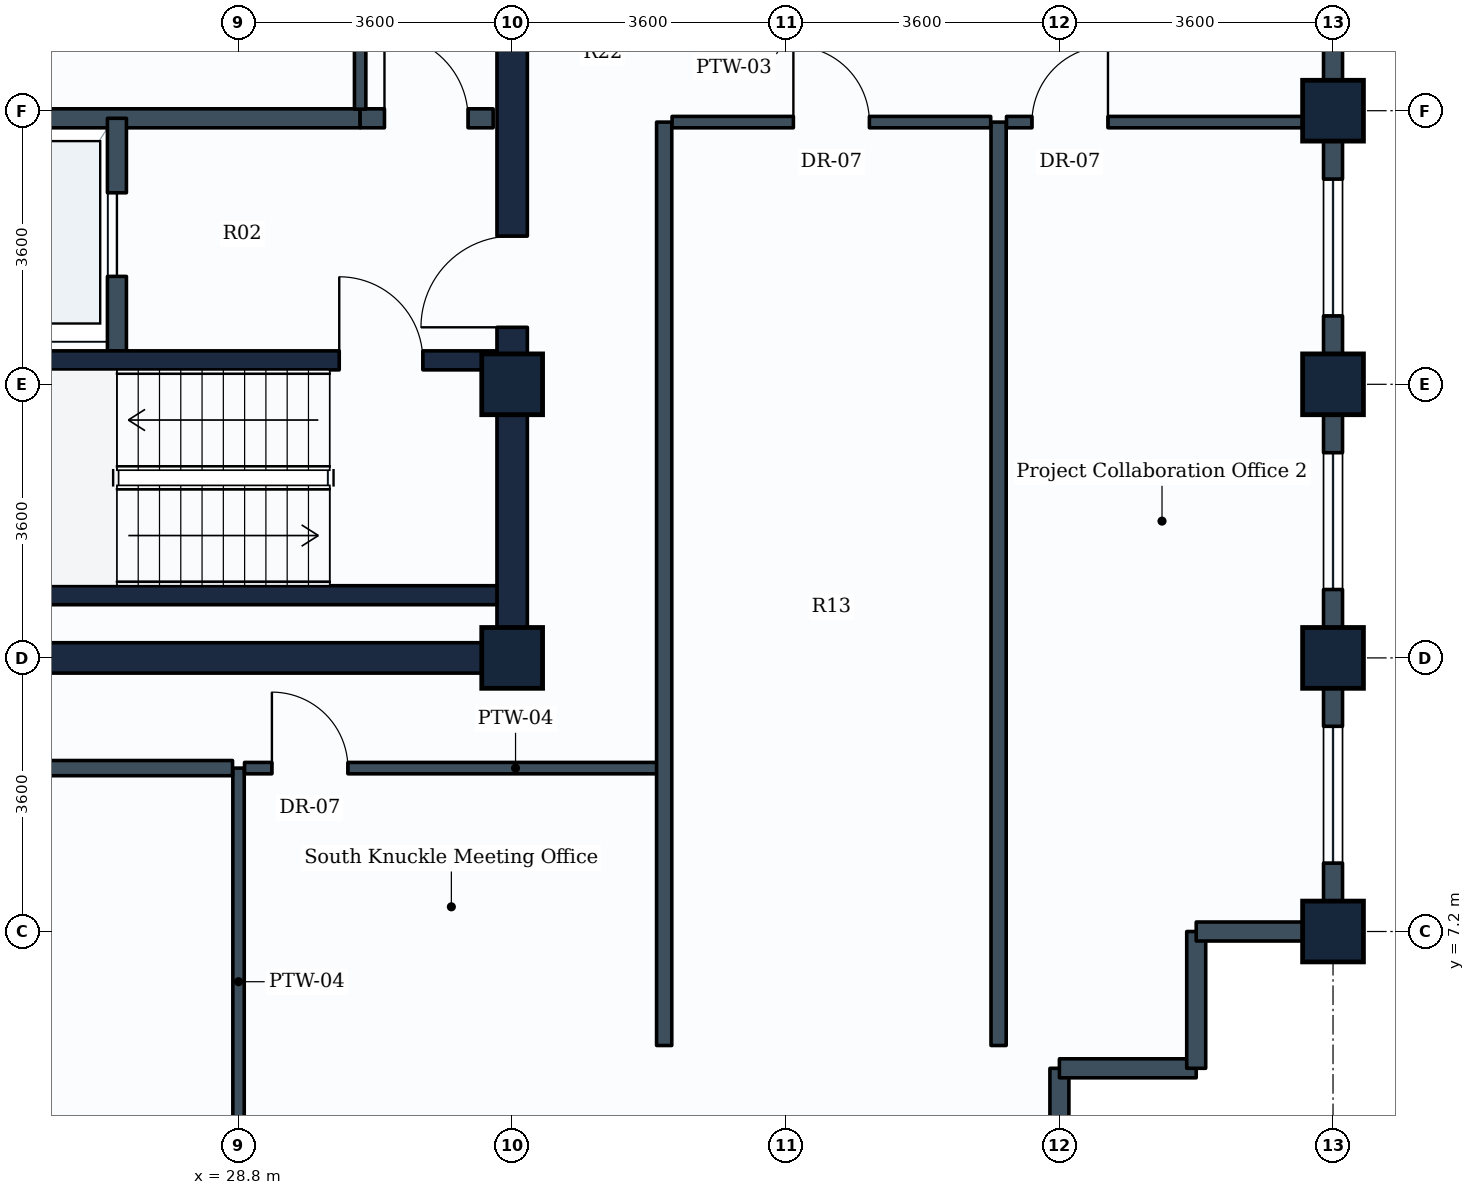
"""IFC4 building model, lengths in metres.
Left out: names, types, materials, properties, quantities, classifications, styles, units other than length and angle.
Written with IfcOpenShell. Run it as: python <this file> out.ifc"""

import sys

from ifc_helpers import new_model, si_unit, direction, frame, frame_2d, origin, origin_2d, place, context, subcontext, project, spatial, rectangle, extrude, element, fill, save


model = new_model("IFC4")
c1 = context("Model", 3, precision=1e-05, world=origin(), true_north=direction((0.0, 1.0)))
c2 = subcontext(c1, "Body", "Model", "MODEL_VIEW")
j1 = project(units=[si_unit("LENGTHUNIT", "METRE"), si_unit("PLANEANGLEUNIT", "RADIAN")], contexts=[c1])
p1 = place(None, origin())
s1 = spatial("IfcSite", under=j1, at=p1, CompositionType="ELEMENT")
p2 = place(p1, origin())
s2 = spatial("IfcBuilding", under=s1, at=p2, CompositionType="ELEMENT")
p3 = place(p2, frame((0.0, 0.0, 273.8)))
s3 = spatial("IfcBuildingStorey", under=s2, at=p3, CompositionType="ELEMENT", Elevation=273.8)
for number, where, z_axis, x_axis in (
    (1, (32.4, 10.8, 0.0), (0.0, 0.0, 1.0), (1.0, 0.0, 0.0)),
    (2, (32.4, 14.4, 0.0), (0.0, 0.0, 1.0), (1.0, 0.0, 0.0)),
    (3, (43.2, 7.2, 0.0), (0.0, 0.0, 1.0), (1.0, 0.0, 0.0)),
    (4, (43.2, 10.8, 0.0), (0.0, 0.0, 1.0), (0.0, 1.0, 0.0)),
    (5, (43.2, 14.4, 0.0), (0.0, 0.0, 1.0), (0.0, 1.0, 0.0)),
    (6, (43.2, 18.0, 0.0), (0.0, 0.0, 1.0), (0.0, 1.0, 0.0)),
):
    element("IfcColumn", number, at=place(p3, frame(where, z_axis=z_axis, x_axis=x_axis)), inside=s3, PredefinedType="COLUMN", context=c2, shape_type="SweptSolid", body=[
        extrude(rectangle(XDim=0.8, YDim=0.8, at=origin_2d()), origin(), (0.0, 0.0, 1.0), 3.6),
    ])
p4 = place(p3, frame((39.6, 5.4, 0.0), z_axis=(0.0, 0.0, 1.0), x_axis=(0.0, -1.0, 0.0)))
e7 = element("IfcWall", 7, at=p4, inside=s3, PredefinedType="STANDARD", context=c2, shape_type="SweptSolid", body=[
    extrude(rectangle(XDim=1.8, YDim=0.25, at=frame_2d((0.9, 0.0))), origin(), (0.0, 0.0, 1.0), 2.83),
])
p5 = place(p3, frame((41.4, 5.4, 0.0), z_axis=(0.0, 0.0, 1.0), x_axis=(-1.0, 0.0, 0.0)))
e8 = element("IfcWall", 8, at=p5, inside=s3, PredefinedType="STANDARD", context=c2, shape_type="SweptSolid", body=[
    extrude(rectangle(XDim=1.8, YDim=0.25, at=frame_2d((0.9, 0.0))), origin(), (0.0, 0.0, 1.0), 3.335),
])
p6 = place(p3, frame((41.4, 7.2, 0.0), z_axis=(0.0, 0.0, 1.0), x_axis=(0.0, -1.0, 0.0)))
e9 = element("IfcWall", 9, at=p6, inside=s3, PredefinedType="STANDARD", context=c2, shape_type="SweptSolid", body=[
    extrude(rectangle(XDim=1.8, YDim=0.25, at=frame_2d((0.9, 0.0))), origin(), (0.0, 0.0, 1.0), 3.335),
])
p7 = place(p3, frame((43.2, 7.2, 0.0), z_axis=(0.0, 0.0, 1.0), x_axis=(-1.0, 0.0, 0.0)))
e10 = element("IfcWall", 10, at=p7, inside=s3, PredefinedType="STANDARD", context=c2, shape_type="SweptSolid", body=[
    extrude(rectangle(XDim=1.8, YDim=0.25, at=frame_2d((0.9, 0.0))), origin(), (0.0, 0.0, 1.0), 2.83),
])
p8 = place(p3, frame((43.2, 10.8, 0.0), z_axis=(0.0, 0.0, 1.0), x_axis=(0.0, -1.0, 0.0)))
e11 = element("IfcWall", 11, at=p8, inside=s3, PredefinedType="STANDARD", context=c2, shape_type="SweptSolid", body=[
    extrude(rectangle(XDim=3.6, YDim=0.25, at=frame_2d((1.8, 0.0))), origin(), (0.0, 0.0, 1.0), 2.83),
])
p9 = place(p8, frame((0.9, 0.0, 0.85)))
e12 = element("IfcOpeningElement", 12, at=p9, cuts=e11, PredefinedType="OPENING", context=c2, shape_type="SweptSolid", body=[
    extrude(rectangle(XDim=1.8, YDim=1.35, at=frame_2d((0.9, 0.675))), frame((0.0, 0.135, 0.0), z_axis=(0.0, -1.0, 0.0), x_axis=(1.0, 0.0, 0.0)), (0.0, 0.0, 1.0), 0.27),
])
p10 = place(p3, frame((43.2, 14.4, 0.0), z_axis=(0.0, 0.0, 1.0), x_axis=(0.0, -1.0, 0.0)))
e13 = element("IfcWall", 13, at=p10, inside=s3, PredefinedType="STANDARD", context=c2, shape_type="SweptSolid", body=[
    extrude(rectangle(XDim=3.6, YDim=0.25, at=frame_2d((1.8, 0.0))), origin(), (0.0, 0.0, 1.0), 2.83),
])
p11 = place(p10, frame((0.9, 0.0, 0.85)))
e14 = element("IfcOpeningElement", 14, at=p11, cuts=e13, PredefinedType="OPENING", context=c2, shape_type="SweptSolid", body=[
    extrude(rectangle(XDim=1.8, YDim=1.35, at=frame_2d((0.9, 0.675))), frame((0.0, 0.135, 0.0), z_axis=(0.0, -1.0, 0.0), x_axis=(1.0, 0.0, 0.0)), (0.0, 0.0, 1.0), 0.27),
])
p12 = place(p3, frame((43.2, 18.0, 0.0), z_axis=(0.0, 0.0, 1.0), x_axis=(0.0, -1.0, 0.0)))
e15 = element("IfcWall", 15, at=p12, inside=s3, PredefinedType="STANDARD", context=c2, shape_type="SweptSolid", body=[
    extrude(rectangle(XDim=3.6, YDim=0.25, at=frame_2d((1.8, 0.0))), origin(), (0.0, 0.0, 1.0), 2.83),
])
p13 = place(p12, frame((0.9, 0.0, 0.85)))
e16 = element("IfcOpeningElement", 16, at=p13, cuts=e15, PredefinedType="OPENING", context=c2, shape_type="SweptSolid", body=[
    extrude(rectangle(XDim=1.8, YDim=1.35, at=frame_2d((0.9, 0.675))), frame((0.0, 0.135, 0.0), z_axis=(0.0, -1.0, 0.0), x_axis=(1.0, 0.0, 0.0)), (0.0, 0.0, 1.0), 0.27),
])
p14 = place(p3, frame((43.2, 21.6, 0.0), z_axis=(0.0, 0.0, 1.0), x_axis=(0.0, -1.0, 0.0)))
e17 = element("IfcWall", 17, at=p14, inside=s3, PredefinedType="STANDARD", context=c2, shape_type="SweptSolid", body=[
    extrude(rectangle(XDim=3.6, YDim=0.25, at=frame_2d((1.8, 0.0))), origin(), (0.0, 0.0, 1.0), 2.83),
])
p15 = place(p3, frame((14.4, 10.8, 0.0), z_axis=(0.0, 0.0, 1.0), x_axis=(1.0, 0.0, 0.0)))
e18 = element("IfcWall", 18, at=p15, inside=s3, PredefinedType="SHEAR", context=c2, shape_type="SweptSolid", body=[
    extrude(rectangle(XDim=18.0, YDim=0.4, at=frame_2d((9.0, 0.0))), origin(), (0.0, 0.0, 1.0), 3.35),
])
p16 = place(p3, frame((32.4, 10.8, 0.0), z_axis=(0.0, 0.0, 1.0), x_axis=(0.0, 1.0, 0.0)))
e19 = element("IfcWall", 19, at=p16, inside=s3, PredefinedType="SHEAR", context=c2, shape_type="SweptSolid", body=[
    extrude(rectangle(XDim=14.4, YDim=0.4, at=frame_2d((7.2, 0.0))), origin(), (0.0, 0.0, 1.0), 3.35),
])
p17 = place(p16, frame((4.35, 0.0, 0.0)))
e20 = element("IfcOpeningElement", 20, at=p17, cuts=e19, PredefinedType="OPENING", context=c2, shape_type="SweptSolid", body=[
    extrude(rectangle(XDim=1.2, YDim=2.1, at=frame_2d((0.6, 1.05))), frame((0.0, 0.21, 0.0), z_axis=(0.0, -1.0, 0.0), x_axis=(1.0, 0.0, 0.0)), (0.0, 0.0, 1.0), 0.42),
])
p18 = place(p16, frame((10.0, 0.0, 0.0)))
e21 = element("IfcOpeningElement", 21, at=p18, cuts=e19, PredefinedType="OPENING", context=c2, shape_type="SweptSolid", body=[
    extrude(rectangle(XDim=1.2, YDim=2.1, at=frame_2d((0.6, 1.05))), frame((0.0, 0.21, 0.0), z_axis=(0.0, -1.0, 0.0), x_axis=(1.0, 0.0, 0.0)), (0.0, 0.0, 1.0), 0.42),
])
p19 = place(p3, frame((23.35, 11.625, 0.0), z_axis=(0.0, 0.0, 1.0), x_axis=(1.0, 0.0, 0.0)))
e22 = element("IfcWall", 22, at=p19, inside=s3, PredefinedType="SHEAR", context=c2, shape_type="SweptSolid", body=[
    extrude(rectangle(XDim=8.85, YDim=0.25, at=frame_2d((4.425, 0.0))), origin(), (0.0, 0.0, 1.0), 3.35),
])
p20 = place(p3, frame((23.35, 14.715, 0.0), z_axis=(0.0, 0.0, 1.0), x_axis=(1.0, 0.0, 0.0)))
e23 = element("IfcWall", 23, at=p20, inside=s3, PredefinedType="SHEAR", context=c2, shape_type="SweptSolid", body=[
    extrude(rectangle(XDim=8.85, YDim=0.25, at=frame_2d((4.425, 0.0))), origin(), (0.0, 0.0, 1.0), 3.35),
])
p21 = place(p20, frame((6.775, 0.0, 0.0)))
e24 = element("IfcOpeningElement", 24, at=p21, cuts=e23, PredefinedType="OPENING", context=c2, shape_type="SweptSolid", body=[
    extrude(rectangle(XDim=1.1, YDim=2.1, at=frame_2d((0.55, 1.05))), frame((0.0, 0.135, 0.0), z_axis=(0.0, -1.0, 0.0), x_axis=(1.0, 0.0, 0.0)), (0.0, 0.0, 1.0), 0.27),
])
p22 = place(p3, frame((21.88, 17.9, 0.0), z_axis=(0.0, 0.0, 1.0), x_axis=(1.0, 0.0, 0.0)))
e25 = element("IfcWall", 25, at=p22, inside=s3, PredefinedType="PARTITIONING", context=c2, shape_type="SweptSolid", body=[
    extrude(rectangle(XDim=8.52, YDim=0.25, at=frame_2d((4.26, 0.0))), origin(), (0.0, 0.0, 1.0), 3.335),
])
p23 = place(p3, frame((30.4, 17.9, 0.0), z_axis=(0.0, 0.0, 1.0), x_axis=(1.0, 0.0, 0.0)))
e26 = element("IfcWall", 26, at=p23, inside=s3, PredefinedType="PARTITIONING", context=c2, shape_type="SweptSolid", body=[
    extrude(rectangle(XDim=1.75, YDim=0.25, at=frame_2d((0.875, 0.0))), origin(), (0.0, 0.0, 1.0), 3.335),
])
p24 = place(p23, frame((0.32, 0.0, 0.0)))
e27 = element("IfcOpeningElement", 27, at=p24, cuts=e26, PredefinedType="OPENING", context=c2, shape_type="SweptSolid", body=[
    extrude(rectangle(XDim=1.1, YDim=2.1, at=frame_2d((0.55, 1.05))), frame((0.0, 0.135, 0.0), z_axis=(0.0, -1.0, 0.0), x_axis=(1.0, 0.0, 0.0)), (0.0, 0.0, 1.0), 0.27),
])
p25 = place(p3, frame((27.2, 14.84, 0.0), z_axis=(0.0, 0.0, 1.0), x_axis=(0.0, 1.0, 0.0)))
e28 = element("IfcWall", 28, at=p25, inside=s3, PredefinedType="PARTITIONING", context=c2, shape_type="SweptSolid", body=[
    extrude(rectangle(XDim=3.06, YDim=0.25, at=frame_2d((1.53, 0.0))), origin(), (0.0, 0.0, 1.0), 3.335),
])
p26 = place(p25, frame((0.98, 0.0, 0.0)))
e29 = element("IfcOpeningElement", 29, at=p26, cuts=e28, PredefinedType="OPENING", context=c2, shape_type="SweptSolid", body=[
    extrude(rectangle(XDim=1.1, YDim=2.1, at=frame_2d((0.55, 1.05))), frame((0.0, 0.135, 0.0), z_axis=(0.0, -1.0, 0.0), x_axis=(1.0, 0.0, 0.0)), (0.0, 0.0, 1.0), 0.27),
])
p27 = place(p3, frame((30.4, 18.02, 0.0), z_axis=(0.0, 0.0, 1.0), x_axis=(0.0, 1.0, 0.0)))
e30 = element("IfcWall", 30, at=p27, inside=s3, PredefinedType="PARTITIONING", context=c2, shape_type="SweptSolid", body=[
    extrude(rectangle(XDim=3.2, YDim=0.15, at=frame_2d((1.6, 0.0))), origin(), (0.0, 0.0, 1.0), 3.335),
])
p28 = place(p3, frame((28.8, 9.35, 0.0), z_axis=(0.0, 0.0, 1.0), x_axis=(0.0, -1.0, 0.0)))
e31 = element("IfcWall", 31, at=p28, inside=s3, PredefinedType="PARTITIONING", context=c2, shape_type="SweptSolid", body=[
    extrude(rectangle(XDim=5.621, YDim=0.15, at=frame_2d((2.811, 0.0))), origin(), (0.0, 0.0, 1.0), 3.335),
])
p29 = place(p3, frame((12.95, 9.35, 0.0), z_axis=(0.0, 0.0, 1.0), x_axis=(1.0, 0.0, 0.0)))
e32 = element("IfcWall", 32, at=p29, inside=s3, PredefinedType="PARTITIONING", context=c2, shape_type="SweptSolid", body=[
    extrude(rectangle(XDim=15.771, YDim=0.2, at=frame_2d((7.885, 0.0))), origin(), (0.0, 0.0, 1.0), 3.02),
])
p30 = place(p29, frame((4.836, 0.0, 0.0)))
e33 = element("IfcOpeningElement", 33, at=p30, cuts=e32, PredefinedType="OPENING", context=c2, shape_type="SweptSolid", body=[
    extrude(rectangle(XDim=1.0, YDim=2.1, at=frame_2d((0.5, 1.05))), frame((0.0, 0.11, 0.0), z_axis=(0.0, -1.0, 0.0), x_axis=(1.0, 0.0, 0.0)), (0.0, 0.0, 1.0), 0.22),
])
p31 = place(p3, frame((28.879, 9.35, 0.0), z_axis=(0.0, 0.0, 1.0), x_axis=(1.0, 0.0, 0.0)))
e34 = element("IfcWall", 34, at=p31, inside=s3, PredefinedType="PARTITIONING", context=c2, shape_type="SweptSolid", body=[
    extrude(rectangle(XDim=5.521, YDim=0.15, at=frame_2d((2.76, 0.0))), origin(), (0.0, 0.0, 1.0), 3.335),
])
p32 = place(p31, frame((0.36, 0.0, 0.0)))
e35 = element("IfcOpeningElement", 35, at=p32, cuts=e34, PredefinedType="OPENING", context=c2, shape_type="SweptSolid", body=[
    extrude(rectangle(XDim=1.0, YDim=2.1, at=frame_2d((0.5, 1.05))), frame((0.0, 0.085, 0.0), z_axis=(0.0, -1.0, 0.0), x_axis=(1.0, 0.0, 0.0)), (0.0, 0.0, 1.0), 0.17),
])
for number, where, z_axis, x_axis in (
    (36, (34.4, 5.7, 0.0), (0.0, 0.0, 1.0), (0.0, 1.0, 0.0)),
    (37, (38.8, 5.7, 0.0), (0.0, 0.0, 1.0), (0.0, 1.0, 0.0)),
):
    element("IfcWall", number, at=place(p3, frame(where, z_axis=z_axis, x_axis=x_axis)), inside=s3, PredefinedType="PARTITIONING", context=c2, shape_type="SweptSolid", body=[
        extrude(rectangle(XDim=12.15, YDim=0.2, at=frame_2d((6.075, 0.0))), origin(), (0.0, 0.0, 1.0), 3.03),
    ])
p33 = place(p3, frame((34.504, 17.85, 0.0), z_axis=(0.0, 0.0, 1.0), x_axis=(1.0, 0.0, 0.0)))
e38 = element("IfcWall", 38, at=p33, inside=s3, PredefinedType="PARTITIONING", context=c2, shape_type="SweptSolid", body=[
    extrude(rectangle(XDim=4.192, YDim=0.15, at=frame_2d((2.096, 0.0))), origin(), (0.0, 0.0, 1.0), 3.02),
])
p34 = place(p33, frame((1.596, 0.0, 0.0)))
e39 = element("IfcOpeningElement", 39, at=p34, cuts=e38, PredefinedType="OPENING", context=c2, shape_type="SweptSolid", body=[
    extrude(rectangle(XDim=1.0, YDim=2.1, at=frame_2d((0.5, 1.05))), frame((0.0, 0.085, 0.0), z_axis=(0.0, -1.0, 0.0), x_axis=(1.0, 0.0, 0.0)), (0.0, 0.0, 1.0), 0.17),
])
p35 = place(p3, frame((38.904, 17.85, 0.0), z_axis=(0.0, 0.0, 1.0), x_axis=(1.0, 0.0, 0.0)))
e40 = element("IfcWall", 40, at=p35, inside=s3, PredefinedType="PARTITIONING", context=c2, shape_type="SweptSolid", body=[
    extrude(rectangle(XDim=4.167, YDim=0.15, at=frame_2d((2.083, 0.0))), origin(), (0.0, 0.0, 1.0), 2.83),
])
p36 = place(p35, frame((0.335, 0.0, 0.0)))
e41 = element("IfcOpeningElement", 41, at=p36, cuts=e40, PredefinedType="OPENING", context=c2, shape_type="SweptSolid", body=[
    extrude(rectangle(XDim=1.0, YDim=2.1, at=frame_2d((0.5, 1.05))), frame((0.0, 0.085, 0.0), z_axis=(0.0, -1.0, 0.0), x_axis=(1.0, 0.0, 0.0)), (0.0, 0.0, 1.0), 0.17),
])
p37 = place(p9, origin())
e42 = element("IfcWindow", 42, at=p37, inside=s3, PartitioningType="SINGLE_PANEL", PredefinedType="WINDOW", context=c2, shape_type="SweptSolid", body=[
    extrude(rectangle(XDim=1.8, YDim=1.35, at=frame_2d((0.9, 0.675))), frame((0.0, 0.03, 0.0), z_axis=(0.0, -1.0, 0.0), x_axis=(1.0, 0.0, 0.0)), (0.0, 0.0, 1.0), 0.06),
])
fill(e12, e42)
p38 = place(p11, origin())
e43 = element("IfcWindow", 43, at=p38, inside=s3, PartitioningType="SINGLE_PANEL", PredefinedType="WINDOW", context=c2, shape_type="SweptSolid", body=[
    extrude(rectangle(XDim=1.8, YDim=1.35, at=frame_2d((0.9, 0.675))), frame((0.0, 0.03, 0.0), z_axis=(0.0, -1.0, 0.0), x_axis=(1.0, 0.0, 0.0)), (0.0, 0.0, 1.0), 0.06),
])
fill(e14, e43)
p39 = place(p13, origin())
e44 = element("IfcWindow", 44, at=p39, inside=s3, PartitioningType="SINGLE_PANEL", PredefinedType="WINDOW", context=c2, shape_type="SweptSolid", body=[
    extrude(rectangle(XDim=1.8, YDim=1.35, at=frame_2d((0.9, 0.675))), frame((0.0, 0.03, 0.0), z_axis=(0.0, -1.0, 0.0), x_axis=(1.0, 0.0, 0.0)), (0.0, 0.0, 1.0), 0.06),
])
fill(e16, e44)
p40 = place(p21, origin())
e45 = element("IfcDoor", 45, at=p40, inside=s3, OperationType="SINGLE_SWING_LEFT", PredefinedType="DOOR", context=c2, shape_type="SweptSolid", body=[
    extrude(rectangle(XDim=1.1, YDim=2.1, at=frame_2d((0.55, 1.05))), frame((0.0, 0.025, 0.0), z_axis=(0.0, -1.0, 0.0), x_axis=(1.0, 0.0, 0.0)), (0.0, 0.0, 1.0), 0.05),
])
fill(e24, e45)
p41 = place(p26, origin())
e46 = element("IfcDoor", 46, at=p41, inside=s3, OperationType="SLIDING_TO_LEFT", PredefinedType="DOOR", context=c2, shape_type="SweptSolid", body=[
    extrude(rectangle(XDim=1.1, YDim=2.1, at=frame_2d((0.55, 1.05))), frame((0.0, 0.025, 0.0), z_axis=(0.0, -1.0, 0.0), x_axis=(1.0, 0.0, 0.0)), (0.0, 0.0, 1.0), 0.05),
])
fill(e29, e46)
p42 = place(p17, origin())
e47 = element("IfcDoor", 47, at=p42, inside=s3, OperationType="SINGLE_SWING_LEFT", PredefinedType="DOOR", context=c2, shape_type="SweptSolid", body=[
    extrude(rectangle(XDim=1.2, YDim=2.1, at=frame_2d((0.6, 1.05))), frame((0.0, 0.025, 0.0), z_axis=(0.0, -1.0, 0.0), x_axis=(1.0, 0.0, 0.0)), (0.0, 0.0, 1.0), 0.05),
])
fill(e20, e47)
p43 = place(p24, origin())
e48 = element("IfcDoor", 48, at=p43, inside=s3, OperationType="SINGLE_SWING_LEFT", PredefinedType="DOOR", context=c2, shape_type="SweptSolid", body=[
    extrude(rectangle(XDim=1.1, YDim=2.1, at=frame_2d((0.55, 1.05))), frame((0.0, 0.025, 0.0), z_axis=(0.0, -1.0, 0.0), x_axis=(1.0, 0.0, 0.0)), (0.0, 0.0, 1.0), 0.05),
])
fill(e27, e48)
p44 = place(p32, origin())
e49 = element("IfcDoor", 49, at=p44, inside=s3, OperationType="SINGLE_SWING_LEFT", PredefinedType="DOOR", context=c2, shape_type="SweptSolid", body=[
    extrude(rectangle(XDim=1.0, YDim=2.1, at=frame_2d((0.5, 1.05))), frame((0.0, 0.025, 0.0), z_axis=(0.0, -1.0, 0.0), x_axis=(1.0, 0.0, 0.0)), (0.0, 0.0, 1.0), 0.05),
])
fill(e35, e49)
p45 = place(p34, origin())
e50 = element("IfcDoor", 50, at=p45, inside=s3, OperationType="SINGLE_SWING_LEFT", PredefinedType="DOOR", context=c2, shape_type="SweptSolid", body=[
    extrude(rectangle(XDim=1.0, YDim=2.1, at=frame_2d((0.5, 1.05))), frame((0.0, 0.025, 0.0), z_axis=(0.0, -1.0, 0.0), x_axis=(1.0, 0.0, 0.0)), (0.0, 0.0, 1.0), 0.05),
])
fill(e39, e50)
p46 = place(p36, origin())
e51 = element("IfcDoor", 51, at=p46, inside=s3, OperationType="SINGLE_SWING_RIGHT", PredefinedType="DOOR", context=c2, shape_type="SweptSolid", body=[
    extrude(rectangle(XDim=1.0, YDim=2.1, at=frame_2d((0.5, 1.05))), frame((0.0, 0.025, 0.0), z_axis=(0.0, -1.0, 0.0), x_axis=(1.0, 0.0, 0.0)), (0.0, 0.0, 1.0), 0.05),
])
fill(e41, e51)
save(model, sys.argv[1])
